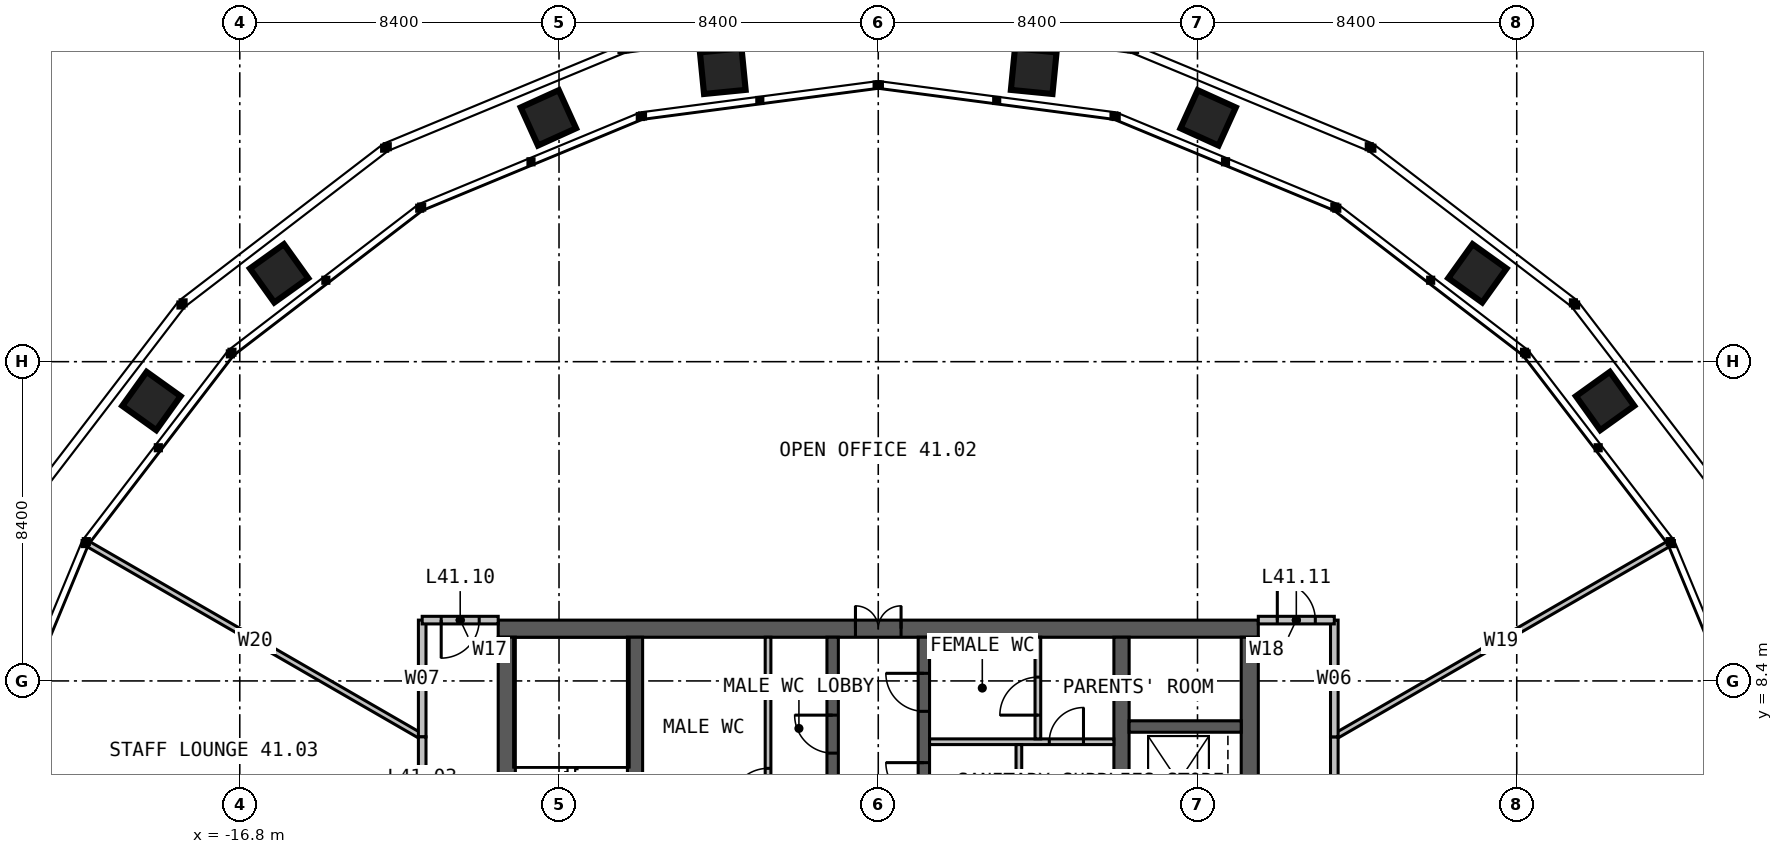
"""IFC4 building model, lengths in metres.
Left out: names, types, materials, properties, quantities, classifications, styles, units other than length and angle.
Written with IfcOpenShell. Run it as: python <this file> out.ifc"""

import sys

from ifc_helpers import new_model, si_unit, direction, frame, frame_2d, origin, place, context, subcontext, project, spatial, rectangle, extrude, element, fill, save


model = new_model("IFC4")
c1 = context("Model", 3, precision=1e-05, world=origin(), true_north=direction((0.0, 1.0)))
c2 = subcontext(c1, "Body", "Model", "MODEL_VIEW")
j1 = project(units=[si_unit("LENGTHUNIT", "METRE"), si_unit("PLANEANGLEUNIT", "RADIAN")], contexts=[c1])
p1 = place(None, origin())
s1 = spatial("IfcSite", under=j1, at=p1, CompositionType="ELEMENT")
p2 = place(p1, origin())
s2 = spatial("IfcBuilding", under=s1, at=p2, CompositionType="ELEMENT")
p3 = place(p2, frame((0.0, 0.0, 171.0)))
s3 = spatial("IfcBuildingStorey", under=s2, at=p3, CompositionType="ELEMENT", Elevation=171.0)
p4 = place(p3, frame((-10.0, 9.775, 0.0), z_axis=(0.0, 0.0, 1.0), x_axis=(1.0, 0.0, 0.0)))
e1 = element("IfcWall", 1, at=p4, inside=s3, PredefinedType="SOLIDWALL", context=c2, shape_type="SweptSolid", body=[
    extrude(rectangle(XDim=20.0, YDim=0.45, at=frame_2d((10.0, 0.0))), origin(), (0.0, 0.0, 1.0), 4.0),
])
p5 = place(p4, frame((9.4, 0.0, 0.0)))
e2 = element("IfcOpeningElement", 2, at=p5, cuts=e1, PredefinedType="OPENING", context=c2, shape_type="SweptSolid", body=[
    extrude(rectangle(XDim=1.2, YDim=2.2, at=frame_2d((0.6, 1.1))), frame((0.0, 0.235, 0.0), z_axis=(0.0, -1.0, 0.0), x_axis=(1.0, 0.0, 0.0)), (0.0, 0.0, 1.0), 0.47),
])
for number, where, z_axis, x_axis in (
    (3, (9.775, -9.55, 0.0), (0.0, 0.0, 1.0), (0.0, 1.0, 0.0)),
    (4, (-9.775, 9.55, 0.0), (0.0, 0.0, 1.0), (0.0, -1.0, 0.0)),
):
    element("IfcWall", number, at=place(p3, frame(where, z_axis=z_axis, x_axis=x_axis)), inside=s3, PredefinedType="SOLIDWALL", context=c2, shape_type="SweptSolid", body=[
        extrude(rectangle(XDim=19.1, YDim=0.45, at=frame_2d((9.55, 0.0))), origin(), (0.0, 0.0, 1.0), 4.0),
    ])
p6 = place(p3, frame((-6.4, -9.55, 0.0), z_axis=(0.0, 0.0, 1.0), x_axis=(0.0, 1.0, 0.0)))
e5 = element("IfcWall", 5, at=p6, inside=s3, PredefinedType="SOLIDWALL", context=c2, shape_type="SweptSolid", body=[
    extrude(rectangle(XDim=19.1, YDim=0.4, at=frame_2d((9.55, 0.0))), origin(), (0.0, 0.0, 1.0), 4.0),
])
p7 = place(p6, frame((9.05, 0.0, 0.0)))
e6 = element("IfcOpeningElement", 6, at=p7, cuts=e5, PredefinedType="OPENING", context=c2, shape_type="SweptSolid", body=[
    extrude(rectangle(XDim=1.0, YDim=2.2, at=frame_2d((0.5, 1.1))), frame((0.0, 0.21, 0.0), z_axis=(0.0, -1.0, 0.0), x_axis=(1.0, 0.0, 0.0)), (0.0, 0.0, 1.0), 0.42),
])
p8 = place(p3, frame((6.4, 9.55, 0.0), z_axis=(0.0, 0.0, 1.0), x_axis=(0.0, -1.0, 0.0)))
e7 = element("IfcWall", 7, at=p8, inside=s3, PredefinedType="SOLIDWALL", context=c2, shape_type="SweptSolid", body=[
    extrude(rectangle(XDim=19.1, YDim=0.4, at=frame_2d((9.55, 0.0))), origin(), (0.0, 0.0, 1.0), 4.0),
])
p9 = place(p8, frame((9.05, 0.0, 0.0)))
e8 = element("IfcOpeningElement", 8, at=p9, cuts=e7, PredefinedType="OPENING", context=c2, shape_type="SweptSolid", body=[
    extrude(rectangle(XDim=1.0, YDim=2.2, at=frame_2d((0.5, 1.1))), frame((0.0, 0.21, 0.0), z_axis=(0.0, -1.0, 0.0), x_axis=(1.0, 0.0, 0.0)), (0.0, 0.0, 1.0), 0.42),
])
p10 = place(p3, frame((-1.2, 1.45, 0.0), z_axis=(0.0, 0.0, 1.0), x_axis=(0.0, 1.0, 0.0)))
e9 = element("IfcWall", 9, at=p10, inside=s3, PredefinedType="SOLIDWALL", context=c2, shape_type="SweptSolid", body=[
    extrude(rectangle(XDim=8.1, YDim=0.3, at=frame_2d((4.05, 0.0))), origin(), (0.0, 0.0, 1.0), 4.0),
])
p11 = place(p10, frame((5.05, 0.0, 0.0)))
e10 = element("IfcOpeningElement", 10, at=p11, cuts=e9, PredefinedType="OPENING", context=c2, shape_type="SweptSolid", body=[
    extrude(rectangle(XDim=1.0, YDim=2.2, at=frame_2d((0.5, 1.1))), frame((0.0, 0.16, 0.0), z_axis=(0.0, -1.0, 0.0), x_axis=(1.0, 0.0, 0.0)), (0.0, 0.0, 1.0), 0.32),
])
p12 = place(p3, frame((1.2, 1.45, 0.0), z_axis=(0.0, 0.0, 1.0), x_axis=(0.0, 1.0, 0.0)))
e11 = element("IfcWall", 11, at=p12, inside=s3, PredefinedType="SOLIDWALL", context=c2, shape_type="SweptSolid", body=[
    extrude(rectangle(XDim=8.1, YDim=0.3, at=frame_2d((4.05, 0.0))), origin(), (0.0, 0.0, 1.0), 4.0),
])
p13 = place(p12, frame((3.8, 0.0, 0.0)))
e12 = element("IfcOpeningElement", 12, at=p13, cuts=e11, PredefinedType="OPENING", context=c2, shape_type="SweptSolid", body=[
    extrude(rectangle(XDim=1.0, YDim=2.2, at=frame_2d((0.5, 1.1))), frame((0.0, 0.16, 0.0), z_axis=(0.0, -1.0, 0.0), x_axis=(1.0, 0.0, 0.0)), (0.0, 0.0, 1.0), 0.32),
])
p14 = place(p12, frame((6.15, 0.0, 0.0)))
e13 = element("IfcOpeningElement", 13, at=p14, cuts=e11, PredefinedType="OPENING", context=c2, shape_type="SweptSolid", body=[
    extrude(rectangle(XDim=1.0, YDim=2.2, at=frame_2d((0.5, 1.1))), frame((0.0, 0.16, 0.0), z_axis=(0.0, -1.0, 0.0), x_axis=(1.0, 0.0, 0.0)), (0.0, 0.0, 1.0), 0.32),
])
p15 = place(p3, frame((6.6, 7.2, 0.0), z_axis=(0.0, 0.0, 1.0), x_axis=(1.0, 0.0, 0.0)))
e14 = element("IfcWall", 14, at=p15, inside=s3, PredefinedType="SOLIDWALL", context=c2, shape_type="SweptSolid", body=[
    extrude(rectangle(XDim=2.95, YDim=0.3, at=frame_2d((1.475, 0.0))), origin(), (0.0, 0.0, 1.0), 4.0),
])
p16 = place(p3, frame((1.35, 6.8, 0.0), z_axis=(0.0, 0.0, 1.0), x_axis=(1.0, 0.0, 0.0)))
e15 = element("IfcWall", 15, at=p16, inside=s3, PredefinedType="PARTITIONING", context=c2, shape_type="SweptSolid", body=[
    extrude(rectangle(XDim=4.85, YDim=0.15, at=frame_2d((2.425, 0.0))), origin(), (0.0, 0.0, 1.0), 3.75),
])
p17 = place(p16, frame((3.15, 0.0, 0.0)))
e16 = element("IfcOpeningElement", 16, at=p17, cuts=e15, PredefinedType="OPENING", context=c2, shape_type="SweptSolid", body=[
    extrude(rectangle(XDim=0.9, YDim=2.2, at=frame_2d((0.45, 1.1))), frame((0.0, 0.085, 0.0), z_axis=(0.0, -1.0, 0.0), x_axis=(1.0, 0.0, 0.0)), (0.0, 0.0, 1.0), 0.17),
])
p18 = place(p3, frame((3.7, 4.75, 0.0), z_axis=(0.0, 0.0, 1.0), x_axis=(0.0, 1.0, 0.0)))
e17 = element("IfcWall", 17, at=p18, inside=s3, PredefinedType="PARTITIONING", context=c2, shape_type="SweptSolid", body=[
    extrude(rectangle(XDim=1.975, YDim=0.15, at=frame_2d((0.988, 0.0))), origin(), (0.0, 0.0, 1.0), 3.75),
])
p19 = place(p3, frame((4.2, 6.875, 0.0), z_axis=(0.0, 0.0, 1.0), x_axis=(0.0, 1.0, 0.0)))
e18 = element("IfcWall", 18, at=p19, inside=s3, PredefinedType="PARTITIONING", context=c2, shape_type="SweptSolid", body=[
    extrude(rectangle(XDim=2.675, YDim=0.15, at=frame_2d((1.337, 0.0))), origin(), (0.0, 0.0, 1.0), 3.75),
])
p20 = place(p19, frame((0.625, 0.0, 0.0)))
e19 = element("IfcOpeningElement", 19, at=p20, cuts=e18, PredefinedType="OPENING", context=c2, shape_type="SweptSolid", body=[
    extrude(rectangle(XDim=1.0, YDim=2.2, at=frame_2d((0.5, 1.1))), frame((0.0, 0.085, 0.0), z_axis=(0.0, -1.0, 0.0), x_axis=(1.0, 0.0, 0.0)), (0.0, 0.0, 1.0), 0.17),
])
p21 = place(p3, frame((-2.9, 4.75, 0.0), z_axis=(0.0, 0.0, 1.0), x_axis=(0.0, 1.0, 0.0)))
e20 = element("IfcWall", 20, at=p21, inside=s3, PredefinedType="PARTITIONING", context=c2, shape_type="SweptSolid", body=[
    extrude(rectangle(XDim=4.8, YDim=0.15, at=frame_2d((2.4, 0.0))), origin(), (0.0, 0.0, 1.0), 3.75),
])
p22 = place(p21, frame((0.35, 0.0, 0.0)))
e21 = element("IfcOpeningElement", 21, at=p22, cuts=e20, PredefinedType="OPENING", context=c2, shape_type="SweptSolid", body=[
    extrude(rectangle(XDim=1.0, YDim=2.2, at=frame_2d((0.5, 1.1))), frame((0.0, 0.085, 0.0), z_axis=(0.0, -1.0, 0.0), x_axis=(1.0, 0.0, 0.0)), (0.0, 0.0, 1.0), 0.17),
])
for number, where, z_axis, x_axis in (
    (22, (12.0, 6.928, 0.0), (0.0, 0.0, 1.0), (0.866, 0.5, 0.0)),
    (23, (-12.0, 6.928, 0.0), (0.0, 0.0, 1.0), (-0.866, 0.5, 0.0)),
):
    element("IfcWall", number, at=place(p3, frame(where, z_axis=z_axis, x_axis=x_axis)), inside=s3, PredefinedType="PARTITIONING", context=c2, shape_type="SweptSolid", body=[
        extrude(rectangle(XDim=10.136, YDim=0.15, at=frame_2d((5.068, 0.0))), origin(), (0.0, 0.0, 1.0), 2.79),
    ])
p23 = place(p3, frame((12.0, -6.928, 0.0), z_axis=(0.0, 0.0, 1.0), x_axis=(0.0, 1.0, 0.0)))
e24 = element("IfcWall", 24, at=p23, inside=s3, PredefinedType="PARTITIONING", context=c2, shape_type="SweptSolid", body=[
    extrude(rectangle(XDim=13.856, YDim=0.2, at=frame_2d((6.928, 0.0))), origin(), (0.0, 0.0, 1.0), 3.8),
])
p24 = place(p23, frame((6.028, 0.0, 0.0)))
e25 = element("IfcOpeningElement", 25, at=p24, cuts=e24, PredefinedType="OPENING", context=c2, shape_type="SweptSolid", body=[
    extrude(rectangle(XDim=1.8, YDim=2.2, at=frame_2d((0.9, 1.1))), frame((0.0, 0.11, 0.0), z_axis=(0.0, -1.0, 0.0), x_axis=(1.0, 0.0, 0.0)), (0.0, 0.0, 1.0), 0.22),
])
for number, where, z_axis, x_axis in (
    (26, (12.0, 6.928, 0.0), (0.0, 0.0, 1.0), (0.0, 1.0, 0.0)),
    (27, (-12.0, 10.0, 0.0), (0.0, 0.0, 1.0), (0.0, -1.0, 0.0)),
):
    element("IfcWall", number, at=place(p3, frame(where, z_axis=z_axis, x_axis=x_axis)), inside=s3, PredefinedType="PARTITIONING", context=c2, shape_type="SweptSolid", body=[
        extrude(rectangle(XDim=3.072, YDim=0.2, at=frame_2d((1.536, 0.0))), origin(), (0.0, 0.0, 1.0), 3.8),
    ])
p25 = place(p3, frame((-12.0, 6.928, 0.0), z_axis=(0.0, 0.0, 1.0), x_axis=(0.0, -1.0, 0.0)))
e28 = element("IfcWall", 28, at=p25, inside=s3, PredefinedType="PARTITIONING", context=c2, shape_type="SweptSolid", body=[
    extrude(rectangle(XDim=5.342, YDim=0.2, at=frame_2d((2.671, 0.0))), origin(), (0.0, 0.0, 1.0), 3.8),
])
p26 = place(p25, frame((1.771, 0.0, 0.0)))
e29 = element("IfcOpeningElement", 29, at=p26, cuts=e28, PredefinedType="OPENING", context=c2, shape_type="SweptSolid", body=[
    extrude(rectangle(XDim=1.8, YDim=2.2, at=frame_2d((0.9, 1.1))), frame((0.0, 0.11, 0.0), z_axis=(0.0, -1.0, 0.0), x_axis=(1.0, 0.0, 0.0)), (0.0, 0.0, 1.0), 0.22),
])
p27 = place(p3, frame((-10.0, 10.0, 0.0), z_axis=(0.0, 0.0, 1.0), x_axis=(-1.0, 0.0, 0.0)))
e30 = element("IfcWall", 30, at=p27, inside=s3, PredefinedType="PARTITIONING", context=c2, shape_type="SweptSolid", body=[
    extrude(rectangle(XDim=2.0, YDim=0.2, at=frame_2d((1.0, 0.0))), origin(), (0.0, 0.0, 1.0), 3.8),
])
p28 = place(p27, frame((0.5, 0.0, 0.0)))
e31 = element("IfcOpeningElement", 31, at=p28, cuts=e30, PredefinedType="OPENING", context=c2, shape_type="SweptSolid", body=[
    extrude(rectangle(XDim=1.0, YDim=2.2, at=frame_2d((0.5, 1.1))), frame((0.0, 0.11, 0.0), z_axis=(0.0, -1.0, 0.0), x_axis=(1.0, 0.0, 0.0)), (0.0, 0.0, 1.0), 0.22),
])
p29 = place(p3, frame((10.0, 10.0, 0.0), z_axis=(0.0, 0.0, 1.0), x_axis=(1.0, 0.0, 0.0)))
e32 = element("IfcWall", 32, at=p29, inside=s3, PredefinedType="PARTITIONING", context=c2, shape_type="SweptSolid", body=[
    extrude(rectangle(XDim=2.0, YDim=0.2, at=frame_2d((1.0, 0.0))), origin(), (0.0, 0.0, 1.0), 3.8),
])
p30 = place(p29, frame((0.5, 0.0, 0.0)))
e33 = element("IfcOpeningElement", 33, at=p30, cuts=e32, PredefinedType="OPENING", context=c2, shape_type="SweptSolid", body=[
    extrude(rectangle(XDim=1.0, YDim=2.2, at=frame_2d((0.5, 1.1))), frame((0.0, 0.11, 0.0), z_axis=(0.0, -1.0, 0.0), x_axis=(1.0, 0.0, 0.0)), (0.0, 0.0, 1.0), 0.22),
])
p31 = place(p5, origin())
e34 = element("IfcDoor", 34, at=p31, inside=s3, OperationType="DOUBLE_DOOR_SINGLE_SWING", PredefinedType="DOOR", context=c2, shape_type="SweptSolid", body=[
    extrude(rectangle(XDim=1.2, YDim=2.2, at=frame_2d((0.6, 1.1))), frame((0.0, 0.025, 0.0), z_axis=(0.0, -1.0, 0.0), x_axis=(1.0, 0.0, 0.0)), (0.0, 0.0, 1.0), 0.05),
])
fill(e2, e34)
p32 = place(p11, origin())
e35 = element("IfcDoor", 35, at=p32, inside=s3, OperationType="SINGLE_SWING_RIGHT", PredefinedType="DOOR", context=c2, shape_type="SweptSolid", body=[
    extrude(rectangle(XDim=1.0, YDim=2.2, at=frame_2d((0.5, 1.1))), frame((0.0, 0.025, 0.0), z_axis=(0.0, -1.0, 0.0), x_axis=(1.0, 0.0, 0.0)), (0.0, 0.0, 1.0), 0.05),
])
fill(e10, e35)
p33 = place(p13, origin())
e36 = element("IfcDoor", 36, at=p33, inside=s3, OperationType="SINGLE_SWING_RIGHT", PredefinedType="DOOR", context=c2, shape_type="SweptSolid", body=[
    extrude(rectangle(XDim=1.0, YDim=2.2, at=frame_2d((0.5, 1.1))), frame((0.0, 0.025, 0.0), z_axis=(0.0, -1.0, 0.0), x_axis=(1.0, 0.0, 0.0)), (0.0, 0.0, 1.0), 0.05),
])
fill(e12, e36)
p34 = place(p14, origin())
e37 = element("IfcDoor", 37, at=p34, inside=s3, OperationType="SINGLE_SWING_RIGHT", PredefinedType="DOOR", context=c2, shape_type="SweptSolid", body=[
    extrude(rectangle(XDim=1.0, YDim=2.2, at=frame_2d((0.5, 1.1))), frame((0.0, 0.025, 0.0), z_axis=(0.0, -1.0, 0.0), x_axis=(1.0, 0.0, 0.0)), (0.0, 0.0, 1.0), 0.05),
])
fill(e13, e37)
p35 = place(p17, origin())
e38 = element("IfcDoor", 38, at=p35, inside=s3, OperationType="SINGLE_SWING_RIGHT", PredefinedType="DOOR", context=c2, shape_type="SweptSolid", body=[
    extrude(rectangle(XDim=0.9, YDim=2.2, at=frame_2d((0.45, 1.1))), frame((0.0, 0.025, 0.0), z_axis=(0.0, -1.0, 0.0), x_axis=(1.0, 0.0, 0.0)), (0.0, 0.0, 1.0), 0.05),
])
fill(e16, e38)
p36 = place(p20, origin())
e39 = element("IfcDoor", 39, at=p36, inside=s3, OperationType="SINGLE_SWING_LEFT", PredefinedType="DOOR", context=c2, shape_type="SweptSolid", body=[
    extrude(rectangle(XDim=1.0, YDim=2.2, at=frame_2d((0.5, 1.1))), frame((0.0, 0.025, 0.0), z_axis=(0.0, -1.0, 0.0), x_axis=(1.0, 0.0, 0.0)), (0.0, 0.0, 1.0), 0.05),
])
fill(e19, e39)
p37 = place(p22, origin())
e40 = element("IfcDoor", 40, at=p37, inside=s3, OperationType="SINGLE_SWING_LEFT", PredefinedType="DOOR", context=c2, shape_type="SweptSolid", body=[
    extrude(rectangle(XDim=1.0, YDim=2.2, at=frame_2d((0.5, 1.1))), frame((0.0, 0.025, 0.0), z_axis=(0.0, -1.0, 0.0), x_axis=(1.0, 0.0, 0.0)), (0.0, 0.0, 1.0), 0.05),
])
fill(e21, e40)
p38 = place(p28, origin())
e41 = element("IfcDoor", 41, at=p38, inside=s3, OperationType="SINGLE_SWING_RIGHT", PredefinedType="DOOR", context=c2, shape_type="SweptSolid", body=[
    extrude(rectangle(XDim=1.0, YDim=2.2, at=frame_2d((0.5, 1.1))), frame((0.0, 0.025, 0.0), z_axis=(0.0, -1.0, 0.0), x_axis=(1.0, 0.0, 0.0)), (0.0, 0.0, 1.0), 0.05),
])
fill(e31, e41)
p39 = place(p30, origin())
e42 = element("IfcDoor", 42, at=p39, inside=s3, OperationType="SINGLE_SWING_LEFT", PredefinedType="DOOR", context=c2, shape_type="SweptSolid", body=[
    extrude(rectangle(XDim=1.0, YDim=2.2, at=frame_2d((0.5, 1.1))), frame((0.0, 0.025, 0.0), z_axis=(0.0, -1.0, 0.0), x_axis=(1.0, 0.0, 0.0)), (0.0, 0.0, 1.0), 0.05),
])
fill(e33, e42)
save(model, sys.argv[1])
